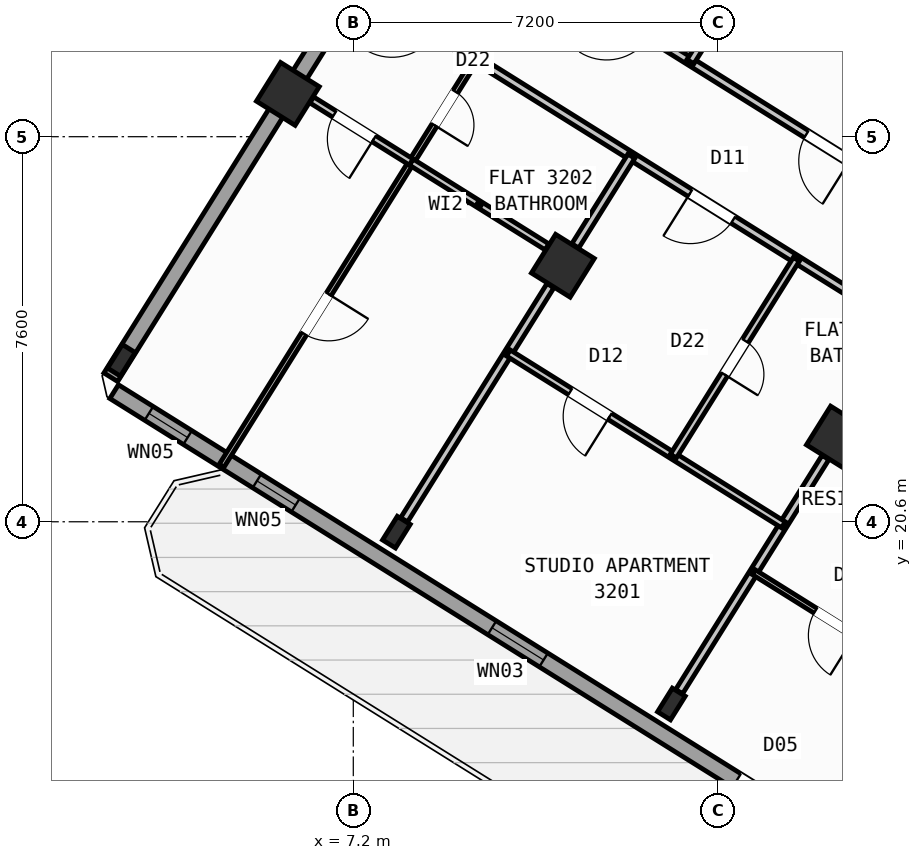
"""IFC4 building model, lengths in metres.
Left out: names, types, materials, properties, quantities, classifications, styles, units other than length and angle.
Written with IfcOpenShell. Run it as: python <this file> out.ifc"""

import sys

from ifc_helpers import new_model, si_unit, direction, frame, frame_2d, origin, origin_2d, place, context, subcontext, project, spatial, rectangle, hollow_rectangle, i_section, extrude, source, transform, mapped, element, fill, save


model = new_model("IFC4")
c1 = context("Model", 3, precision=1e-05, world=origin(), true_north=direction((0.0, 1.0)))
c2 = subcontext(c1, "Body", "Model", "MODEL_VIEW")
j1 = project(units=[si_unit("LENGTHUNIT", "METRE"), si_unit("PLANEANGLEUNIT", "RADIAN")], contexts=[c1])
p1 = place(None, origin())
s1 = spatial("IfcSite", under=j1, at=p1, CompositionType="ELEMENT")
p2 = place(p1, origin())
s2 = spatial("IfcBuilding", under=s1, at=p2, CompositionType="ELEMENT")
p3 = place(p2, frame((0.0, 0.0, 127.8)))
s3 = spatial("IfcBuildingStorey", under=s2, at=p3, CompositionType="ELEMENT", Elevation=127.8)
m1 = source(origin(), c2, "Body", "SweptSolid", [
    extrude(hollow_rectangle(XDim=0.9, YDim=0.9, WallThickness=0.036, at=origin_2d()), origin(), (0.0, 0.0, 1.0), 4.8),
])
p4 = place(p3, frame((16.764, 22.261, 0.0), z_axis=(0.0, 0.0, 1.0), x_axis=(-0.848048096156, 0.529919264233, 0.0)))
e1 = element("IfcColumn", 1, at=p4, inside=s3, PredefinedType="COLUMN", context=c2, shape_type="MappedRepresentation", body=[
    mapped(m1, transform((0.0, 0.0, 0.0), scale=1.0)),
])
m2 = source(origin(), c2, "Body", "SweptSolid", [
    extrude(i_section(OverallWidth=0.3, OverallDepth=0.55, WebThickness=0.015, FlangeThickness=0.029, at=origin_2d()), origin(), (0.0, 0.0, 1.0), 4.8),
])
p5 = place(p3, frame((13.478, 17.003, 0.0), z_axis=(0.0, 0.0, 1.0), x_axis=(-0.848048096156, 0.529919264233, 0.0)))
e2 = element("IfcColumn", 2, at=p5, inside=s3, PredefinedType="COLUMN", context=c2, shape_type="MappedRepresentation", body=[
    mapped(m2, transform((0.0, 0.0, 0.0), scale=1.0)),
])
p6 = place(p3, frame((11.336, 25.653, 0.0), z_axis=(0.0, 0.0, 1.0), x_axis=(-0.848048096156, 0.529919264233, 0.0)))
e3 = element("IfcColumn", 3, at=p6, inside=s3, PredefinedType="COLUMN", context=c2, shape_type="MappedRepresentation", body=[
    mapped(m1, transform((0.0, 0.0, 0.0), scale=1.0)),
])
p7 = place(p3, frame((8.051, 20.395, 0.0), z_axis=(0.0, 0.0, 1.0), x_axis=(-0.848048096156, 0.529919264233, 0.0)))
e4 = element("IfcColumn", 4, at=p7, inside=s3, PredefinedType="COLUMN", context=c2, shape_type="MappedRepresentation", body=[
    mapped(m2, transform((0.0, 0.0, 0.0), scale=1.0)),
])
p8 = place(p3, frame((5.909, 29.044, 0.0), z_axis=(0.0, 0.0, 1.0), x_axis=(-0.848048096156, 0.529919264233, 0.0)))
e5 = element("IfcColumn", 5, at=p8, inside=s3, PredefinedType="COLUMN", context=c2, shape_type="MappedRepresentation", body=[
    mapped(m1, transform((0.0, 0.0, 0.0), scale=1.0)),
])
p9 = place(p3, frame((2.623, 23.786, 0.0), z_axis=(0.0, 0.0, 1.0), x_axis=(-0.848048096156, 0.529919264233, 0.0)))
e6 = element("IfcColumn", 6, at=p9, inside=s3, PredefinedType="COLUMN", context=c2, shape_type="MappedRepresentation", body=[
    mapped(m2, transform((0.0, 0.0, 0.0), scale=1.0)),
])
p10 = place(p3, frame((29.268, 6.429, 0.0), z_axis=(0.0, 0.0, 1.0), x_axis=(-0.848049971435, 0.529916263149, 0.0)))
e7 = element("IfcWall", 7, at=p10, inside=s3, PredefinedType="STANDARD", context=c2, shape_type="SweptSolid", body=[
    extrude(rectangle(XDim=31.588, YDim=0.32, at=frame_2d((15.794, 0.0))), origin(), (0.0, 0.0, 1.0), 4.55),
])
p11 = place(p10, frame((15.901, 0.0, 0.0)))
e8 = element("IfcOpeningElement", 8, at=p11, cuts=e7, PredefinedType="OPENING", context=c2, shape_type="SweptSolid", body=[
    extrude(rectangle(XDim=1.2, YDim=2.15, at=frame_2d((0.6, 1.075))), frame((0.0, 0.17, 0.0), z_axis=(0.0, -1.0, 0.0), x_axis=(1.0, 0.0, 0.0)), (0.0, 0.0, 1.0), 0.34),
])
p12 = place(p10, frame((3.454, 0.0, 0.95)))
e9 = element("IfcOpeningElement", 9, at=p12, cuts=e7, PredefinedType="OPENING", context=c2, shape_type="SweptSolid", body=[
    extrude(rectangle(XDim=1.2, YDim=1.4, at=frame_2d((0.6, 0.7))), frame((0.0, 0.17, 0.0), z_axis=(0.0, -1.0, 0.0), x_axis=(1.0, 0.0, 0.0)), (0.0, 0.0, 1.0), 0.34),
])
p13 = place(p10, frame((7.561, 0.0, 0.85)))
e10 = element("IfcOpeningElement", 10, at=p13, cuts=e7, PredefinedType="OPENING", context=c2, shape_type="SweptSolid", body=[
    extrude(rectangle(XDim=1.8, YDim=1.5, at=frame_2d((0.9, 0.75))), frame((0.0, 0.17, 0.0), z_axis=(0.0, -1.0, 0.0), x_axis=(1.0, 0.0, 0.0)), (0.0, 0.0, 1.0), 0.34),
])
p14 = place(p10, frame((21.594, 0.0, 0.95)))
e11 = element("IfcOpeningElement", 11, at=p14, cuts=e7, PredefinedType="OPENING", context=c2, shape_type="SweptSolid", body=[
    extrude(rectangle(XDim=1.2, YDim=1.4, at=frame_2d((0.6, 0.7))), frame((0.0, 0.17, 0.0), z_axis=(0.0, -1.0, 0.0), x_axis=(1.0, 0.0, 0.0)), (0.0, 0.0, 1.0), 0.34),
])
p15 = place(p10, frame((29.878, 0.0, 1.0)))
e12 = element("IfcOpeningElement", 12, at=p15, cuts=e7, PredefinedType="OPENING", context=c2, shape_type="SweptSolid", body=[
    extrude(rectangle(XDim=0.9, YDim=1.25, at=frame_2d((0.45, 0.625))), frame((0.0, 0.17, 0.0), z_axis=(0.0, -1.0, 0.0), x_axis=(1.0, 0.0, 0.0)), (0.0, 0.0, 1.0), 0.34),
])
p16 = place(p10, frame((27.364, 0.0, 1.0)))
e13 = element("IfcOpeningElement", 13, at=p16, cuts=e7, PredefinedType="OPENING", context=c2, shape_type="SweptSolid", body=[
    extrude(rectangle(XDim=0.9, YDim=1.25, at=frame_2d((0.45, 0.625))), frame((0.0, 0.17, 0.0), z_axis=(0.0, -1.0, 0.0), x_axis=(1.0, 0.0, 0.0)), (0.0, 0.0, 1.0), 0.34),
])
p17 = place(p3, frame((2.415, 23.452, 0.0), z_axis=(0.0, 0.0, 1.0), x_axis=(0.52991049553, 0.848053575387, 0.0)))
e14 = element("IfcWall", 14, at=p17, inside=s3, PredefinedType="STANDARD", context=c2, shape_type="SweptSolid", body=[
    extrude(rectangle(XDim=21.587, YDim=0.32, at=frame_2d((10.794, 0.0))), origin(), (0.0, 0.0, 1.0), 3.975),
])
p18 = place(p17, frame((16.344, 0.0, 0.75)))
e15 = element("IfcOpeningElement", 15, at=p18, cuts=e14, PredefinedType="OPENING", context=c2, shape_type="SweptSolid", body=[
    extrude(rectangle(XDim=2.4, YDim=1.6, at=frame_2d((1.2, 0.8))), frame((0.0, 0.17, 0.0), z_axis=(0.0, -1.0, 0.0), x_axis=(1.0, 0.0, 0.0)), (0.0, 0.0, 1.0), 0.34),
])
p19 = place(p3, frame((14.138, 41.825, 0.0), z_axis=(0.0, 0.0, 1.0), x_axis=(0.848046498049, -0.529921821731, 0.0)))
e16 = element("IfcWall", 16, at=p19, inside=s3, PredefinedType="STANDARD", context=c2, shape_type="SweptSolid", body=[
    extrude(rectangle(XDim=31.588, YDim=0.32, at=frame_2d((15.794, 0.0))), origin(), (0.0, 0.0, 1.0), 4.55),
])
p20 = place(p19, frame((9.69, 0.0, 0.0)))
e17 = element("IfcOpeningElement", 17, at=p20, cuts=e16, PredefinedType="OPENING", context=c2, shape_type="SweptSolid", body=[
    extrude(rectangle(XDim=1.05, YDim=2.15, at=frame_2d((0.525, 1.075))), frame((0.0, 0.17, 0.0), z_axis=(0.0, -1.0, 0.0), x_axis=(1.0, 0.0, 0.0)), (0.0, 0.0, 1.0), 0.34),
])
p21 = place(p19, frame((14.666, 0.0, 0.0)))
e18 = element("IfcOpeningElement", 18, at=p21, cuts=e16, PredefinedType="OPENING", context=c2, shape_type="SweptSolid", body=[
    extrude(rectangle(XDim=1.5, YDim=2.25, at=frame_2d((0.75, 1.125))), frame((0.0, 0.17, 0.0), z_axis=(0.0, -1.0, 0.0), x_axis=(1.0, 0.0, 0.0)), (0.0, 0.0, 1.0), 0.34),
])
p22 = place(p19, frame((0.791, 0.0, 0.85)))
e19 = element("IfcOpeningElement", 19, at=p22, cuts=e16, PredefinedType="OPENING", context=c2, shape_type="SweptSolid", body=[
    extrude(rectangle(XDim=1.8, YDim=1.5, at=frame_2d((0.9, 0.75))), frame((0.0, 0.17, 0.0), z_axis=(0.0, -1.0, 0.0), x_axis=(1.0, 0.0, 0.0)), (0.0, 0.0, 1.0), 0.34),
])
p23 = place(p19, frame((3.996, 0.0, 0.95)))
e20 = element("IfcOpeningElement", 20, at=p23, cuts=e16, PredefinedType="OPENING", context=c2, shape_type="SweptSolid", body=[
    extrude(rectangle(XDim=1.2, YDim=1.4, at=frame_2d((0.6, 0.7))), frame((0.0, 0.17, 0.0), z_axis=(0.0, -1.0, 0.0), x_axis=(1.0, 0.0, 0.0)), (0.0, 0.0, 1.0), 0.34),
])
p24 = place(p19, frame((7.582, 0.0, 0.95)))
e21 = element("IfcOpeningElement", 21, at=p24, cuts=e16, PredefinedType="OPENING", context=c2, shape_type="SweptSolid", body=[
    extrude(rectangle(XDim=1.2, YDim=1.4, at=frame_2d((0.6, 0.7))), frame((0.0, 0.17, 0.0), z_axis=(0.0, -1.0, 0.0), x_axis=(1.0, 0.0, 0.0)), (0.0, 0.0, 1.0), 0.34),
])
p25 = place(p19, frame((21.381, 0.0, 0.75)))
e22 = element("IfcOpeningElement", 22, at=p25, cuts=e16, PredefinedType="OPENING", context=c2, shape_type="SweptSolid", body=[
    extrude(rectangle(XDim=2.4, YDim=1.6, at=frame_2d((1.2, 0.8))), frame((0.0, 0.17, 0.0), z_axis=(0.0, -1.0, 0.0), x_axis=(1.0, 0.0, 0.0)), (0.0, 0.0, 1.0), 0.34),
])
p26 = place(p19, frame((26.956, 0.0, 0.75)))
e23 = element("IfcOpeningElement", 23, at=p26, cuts=e16, PredefinedType="OPENING", context=c2, shape_type="SweptSolid", body=[
    extrude(rectangle(XDim=2.4, YDim=1.6, at=frame_2d((1.2, 0.8))), frame((0.0, 0.17, 0.0), z_axis=(0.0, -1.0, 0.0), x_axis=(1.0, 0.0, 0.0)), (0.0, 0.0, 1.0), 0.34),
])
p27 = place(p3, frame((21.329, 22.416, 0.0), z_axis=(0.0, 0.0, 1.0), x_axis=(-0.529920220799, -0.848047498427, 0.0)))
e24 = element("IfcWall", 24, at=p27, inside=s3, PredefinedType="PARTITIONING", context=c2, shape_type="SweptSolid", body=[
    extrude(rectangle(XDim=9.2, YDim=0.16, at=frame_2d((4.6, 0.0))), origin(), (0.0, 0.0, 1.0), 4.54),
])
p28 = place(p3, frame((22.495, 24.281, 0.0), z_axis=(0.0, 0.0, 1.0), x_axis=(-0.848052408131, 0.529912363569, 0.0)))
e25 = element("IfcWall", 25, at=p28, inside=s3, PredefinedType="PARTITIONING", context=c2, shape_type="SweptSolid", body=[
    extrude(rectangle(XDim=16.73, YDim=0.16, at=frame_2d((8.365, 0.0))), origin(), (0.0, 0.0, 1.0), 4.54),
])
p29 = place(p28, frame((2.22, 0.0, 0.0)))
e26 = element("IfcOpeningElement", 26, at=p29, cuts=e25, PredefinedType="OPENING", context=c2, shape_type="SweptSolid", body=[
    extrude(rectangle(XDim=0.86, YDim=2.05, at=frame_2d((0.43, 1.025))), frame((0.0, 0.09, 0.0), z_axis=(0.0, -1.0, 0.0), x_axis=(1.0, 0.0, 0.0)), (0.0, 0.0, 1.0), 0.18),
])
p30 = place(p28, frame((6.49, 0.0, 0.0)))
e27 = element("IfcOpeningElement", 27, at=p30, cuts=e25, PredefinedType="OPENING", context=c2, shape_type="SweptSolid", body=[
    extrude(rectangle(XDim=1.0, YDim=2.1, at=frame_2d((0.5, 1.05))), frame((0.0, 0.09, 0.0), z_axis=(0.0, -1.0, 0.0), x_axis=(1.0, 0.0, 0.0)), (0.0, 0.0, 1.0), 0.18),
])
p31 = place(p28, frame((11.14, 0.0, 0.0)))
e28 = element("IfcOpeningElement", 28, at=p31, cuts=e25, PredefinedType="OPENING", context=c2, shape_type="SweptSolid", body=[
    extrude(rectangle(XDim=1.0, YDim=2.1, at=frame_2d((0.5, 1.05))), frame((0.0, 0.09, 0.0), z_axis=(0.0, -1.0, 0.0), x_axis=(1.0, 0.0, 0.0)), (0.0, 0.0, 1.0), 0.18),
])
p32 = place(p3, frame((21.329, 22.416, 0.0), z_axis=(0.0, 0.0, 1.0), x_axis=(-0.848052408131, 0.529912363569, 0.0)))
e29 = element("IfcWall", 29, at=p32, inside=s3, PredefinedType="PARTITIONING", context=c2, shape_type="SweptSolid", body=[
    extrude(rectangle(XDim=16.73, YDim=0.16, at=frame_2d((8.365, 0.0))), origin(), (0.0, 0.0, 1.0), 4.54),
])
p33 = place(p32, frame((1.395, 0.0, 0.0)))
e30 = element("IfcOpeningElement", 30, at=p33, cuts=e29, PredefinedType="OPENING", context=c2, shape_type="SweptSolid", body=[
    extrude(rectangle(XDim=1.0, YDim=2.1, at=frame_2d((0.5, 1.05))), frame((0.0, 0.09, 0.0), z_axis=(0.0, -1.0, 0.0), x_axis=(1.0, 0.0, 0.0)), (0.0, 0.0, 1.0), 0.18),
])
p34 = place(p32, frame((7.82, 0.0, 0.0)))
e31 = element("IfcOpeningElement", 31, at=p34, cuts=e29, PredefinedType="OPENING", context=c2, shape_type="SweptSolid", body=[
    extrude(rectangle(XDim=1.0, YDim=2.1, at=frame_2d((0.5, 1.05))), frame((0.0, 0.09, 0.0), z_axis=(0.0, -1.0, 0.0), x_axis=(1.0, 0.0, 0.0)), (0.0, 0.0, 1.0), 0.18),
])
p35 = place(p32, frame((14.76, 0.0, 0.0)))
e32 = element("IfcOpeningElement", 32, at=p35, cuts=e29, PredefinedType="OPENING", context=c2, shape_type="SweptSolid", body=[
    extrude(rectangle(XDim=1.0, YDim=2.1, at=frame_2d((0.5, 1.05))), frame((0.0, 0.09, 0.0), z_axis=(0.0, -1.0, 0.0), x_axis=(1.0, 0.0, 0.0)), (0.0, 0.0, 1.0), 0.18),
])
p36 = place(p3, frame((16.519, 21.87, 0.0), z_axis=(0.0, 0.0, 1.0), x_axis=(-0.529922447305, -0.848046107144, 0.0)))
e33 = element("IfcWall", 33, at=p36, inside=s3, PredefinedType="PARTITIONING", context=c2, shape_type="SweptSolid", body=[
    extrude(rectangle(XDim=5.451, YDim=0.16, at=frame_2d((2.726, 0.0))), origin(), (0.0, 0.0, 1.0), 3.975),
])
p37 = place(p3, frame((18.318, 17.597, 0.0), z_axis=(0.0, 0.0, 1.0), x_axis=(-0.848059820872, 0.529900500304, 0.0)))
e34 = element("IfcWall", 34, at=p37, inside=s3, PredefinedType="PARTITIONING", context=c2, shape_type="SweptSolid", body=[
    extrude(rectangle(XDim=3.79, YDim=0.11, at=frame_2d((1.895, 0.0))), origin(), (0.0, 0.0, 1.0), 4.54),
])
p38 = place(p37, frame((1.435, 0.0, 0.0)))
e35 = element("IfcOpeningElement", 35, at=p38, cuts=e34, PredefinedType="OPENING", context=c2, shape_type="SweptSolid", body=[
    extrude(rectangle(XDim=0.92, YDim=2.08, at=frame_2d((0.46, 1.04))), frame((0.0, 0.065, 0.0), z_axis=(0.0, -1.0, 0.0), x_axis=(1.0, 0.0, 0.0)), (0.0, 0.0, 1.0), 0.13),
])
p39 = place(p3, frame((12.688, 27.815, 0.0), z_axis=(0.0, 0.0, 1.0), x_axis=(-0.529988430496, -0.848004872356, 0.0)))
e36 = element("IfcWall", 36, at=p39, inside=s3, PredefinedType="PARTITIONING", context=c2, shape_type="SweptSolid", body=[
    extrude(rectangle(XDim=2.088, YDim=0.16, at=frame_2d((1.044, 0.0))), origin(), (0.0, 0.0, 1.0), 3.975),
])
p40 = place(p3, frame((11.091, 25.261, 0.0), z_axis=(0.0, 0.0, 1.0), x_axis=(-0.52994257524, -0.848033529377, 0.0)))
e37 = element("IfcWall", 37, at=p40, inside=s3, PredefinedType="PARTITIONING", context=c2, shape_type="SweptSolid", body=[
    extrude(rectangle(XDim=5.451, YDim=0.16, at=frame_2d((2.726, 0.0))), origin(), (0.0, 0.0, 1.0), 3.975),
])
p41 = place(p3, frame((15.688, 20.54, 0.0), z_axis=(0.0, 0.0, 1.0), x_axis=(-0.848049732085, 0.529916646191, 0.0)))
e38 = element("IfcWall", 38, at=p41, inside=s3, PredefinedType="PLUMBINGWALL", context=c2, shape_type="SweptSolid", body=[
    extrude(rectangle(XDim=6.4, YDim=0.14, at=frame_2d((3.2, 0.0))), origin(), (0.0, 0.0, 1.0), 4.54),
])
p42 = place(p41, frame((4.04, 0.0, 0.0)))
e39 = element("IfcOpeningElement", 39, at=p42, cuts=e38, PredefinedType="OPENING", context=c2, shape_type="SweptSolid", body=[
    extrude(rectangle(XDim=0.92, YDim=2.08, at=frame_2d((0.46, 1.04))), frame((0.0, 0.08, 0.0), z_axis=(0.0, -1.0, 0.0), x_axis=(1.0, 0.0, 0.0)), (0.0, 0.0, 1.0), 0.16),
])
p43 = place(p3, frame((15.944, 25.781, 0.0), z_axis=(0.0, 0.0, 1.0), x_axis=(-0.529917480809, -0.848049210561, 0.0)))
e40 = element("IfcWall", 40, at=p43, inside=s3, PredefinedType="PLUMBINGWALL", context=c2, shape_type="SweptSolid", body=[
    extrude(rectangle(XDim=4.58, YDim=0.14, at=frame_2d((2.29, 0.0))), origin(), (0.0, 0.0, 1.0), 4.54),
])
p44 = place(p43, frame((1.9, 0.0, 0.0)))
e41 = element("IfcOpeningElement", 41, at=p44, cuts=e40, PredefinedType="OPENING", context=c2, shape_type="SweptSolid", body=[
    extrude(rectangle(XDim=0.78, YDim=2.05, at=frame_2d((0.39, 1.025))), frame((0.0, 0.08, 0.0), z_axis=(0.0, -1.0, 0.0), x_axis=(1.0, 0.0, 0.0)), (0.0, 0.0, 1.0), 0.16),
])
p45 = place(p3, frame((9.617, 29.734, 0.0), z_axis=(0.0, 0.0, 1.0), x_axis=(-0.529917830441, -0.848048992088, 0.0)))
e42 = element("IfcWall", 42, at=p45, inside=s3, PredefinedType="PARTITIONING", context=c2, shape_type="SweptSolid", body=[
    extrude(rectangle(XDim=9.47, YDim=0.11, at=frame_2d((4.735, 0.0))), origin(), (0.0, 0.0, 1.0), 4.54),
])
p46 = place(p45, frame((0.76, 0.0, 0.0)))
e43 = element("IfcOpeningElement", 43, at=p46, cuts=e42, PredefinedType="OPENING", context=c2, shape_type="SweptSolid", body=[
    extrude(rectangle(XDim=0.78, YDim=2.05, at=frame_2d((0.39, 1.025))), frame((0.0, 0.065, 0.0), z_axis=(0.0, -1.0, 0.0), x_axis=(1.0, 0.0, 0.0)), (0.0, 0.0, 1.0), 0.13),
])
p47 = place(p45, frame((5.475, 0.0, 0.0)))
e44 = element("IfcOpeningElement", 44, at=p47, cuts=e42, PredefinedType="OPENING", context=c2, shape_type="SweptSolid", body=[
    extrude(rectangle(XDim=0.92, YDim=2.08, at=frame_2d((0.46, 1.04))), frame((0.0, 0.065, 0.0), z_axis=(0.0, -1.0, 0.0), x_axis=(1.0, 0.0, 0.0)), (0.0, 0.0, 1.0), 0.13),
])
p48 = place(p3, frame((8.346, 27.698, 0.0), z_axis=(0.0, 0.0, 1.0), x_axis=(-0.848021970166, 0.529961072265, 0.0)))
e45 = element("IfcWall", 45, at=p48, inside=s3, PredefinedType="PLUMBINGWALL", context=c2, shape_type="SweptSolid", body=[
    extrude(rectangle(XDim=2.318, YDim=0.14, at=frame_2d((1.159, 0.0))), origin(), (0.0, 0.0, 1.0), 3.975),
])
p49 = place(p48, frame((0.87, 0.0, 0.0)))
e46 = element("IfcOpeningElement", 46, at=p49, cuts=e45, PredefinedType="OPENING", context=c2, shape_type="SweptSolid", body=[
    extrude(rectangle(XDim=0.92, YDim=2.08, at=frame_2d((0.46, 1.04))), frame((0.0, 0.08, 0.0), z_axis=(0.0, -1.0, 0.0), x_axis=(1.0, 0.0, 0.0)), (0.0, 0.0, 1.0), 0.16),
])
p50 = place(p3, frame((11.024, 26.025, 0.0), z_axis=(0.0, 0.0, 1.0), x_axis=(-0.848054764307, 0.529908592812, 0.0)))
e47 = element("IfcWall", 47, at=p50, inside=s3, PredefinedType="PLUMBINGWALL", context=c2, shape_type="SweptSolid", body=[
    extrude(rectangle(XDim=3.158, YDim=0.14, at=frame_2d((1.579, 0.0))), origin(), (0.0, 0.0, 1.0), 3.975),
])
p51 = place(p3, frame((14.96, 31.452, 0.0), z_axis=(0.0, 0.0, 1.0), x_axis=(-0.529956894714, -0.848024580862, 0.0)))
e48 = element("IfcWall", 48, at=p51, inside=s3, PredefinedType="PARTITIONING", context=c2, shape_type="SweptSolid", body=[
    extrude(rectangle(XDim=2.088, YDim=0.16, at=frame_2d((1.044, 0.0))), origin(), (0.0, 0.0, 1.0), 3.975),
])
m3 = source(origin(), c2, "Body", "SweptSolid", [
    extrude(rectangle(XDim=1.2, YDim=2.15, at=frame_2d((0.6, 1.075))), frame((0.0, 0.025, 0.0), z_axis=(0.0, -1.0, 0.0), x_axis=(1.0, 0.0, 0.0)), (0.0, 0.0, 1.0), 0.05),
])
p52 = place(p11, origin())
e49 = element("IfcDoor", 49, at=p52, inside=s3, OperationType="SINGLE_SWING_LEFT", PredefinedType="DOOR", context=c2, shape_type="MappedRepresentation", body=[
    mapped(m3, transform((0.0, 0.0, 0.0), scale=1.0)),
])
fill(e8, e49)
m4 = source(origin(), c2, "Body", "SweptSolid", [
    extrude(rectangle(XDim=1.2, YDim=1.4, at=frame_2d((0.6, 0.7))), frame((0.0, 0.03, 0.0), z_axis=(0.0, -1.0, 0.0), x_axis=(1.0, 0.0, 0.0)), (0.0, 0.0, 1.0), 0.06),
])
p53 = place(p14, origin())
e50 = element("IfcWindow", 50, at=p53, inside=s3, PartitioningType="SINGLE_PANEL", PredefinedType="WINDOW", context=c2, shape_type="MappedRepresentation", body=[
    mapped(m4, transform((0.0, 0.0, 0.0), scale=1.0)),
])
fill(e11, e50)
m5 = source(origin(), c2, "Body", "SweptSolid", [
    extrude(rectangle(XDim=0.9, YDim=1.25, at=frame_2d((0.45, 0.625))), frame((0.0, 0.03, 0.0), z_axis=(0.0, -1.0, 0.0), x_axis=(1.0, 0.0, 0.0)), (0.0, 0.0, 1.0), 0.06),
])
p54 = place(p15, origin())
e51 = element("IfcWindow", 51, at=p54, inside=s3, PartitioningType="SINGLE_PANEL", PredefinedType="WINDOW", context=c2, shape_type="MappedRepresentation", body=[
    mapped(m5, transform((0.0, 0.0, 0.0), scale=1.0)),
])
fill(e12, e51)
p55 = place(p16, origin())
e52 = element("IfcWindow", 52, at=p55, inside=s3, PartitioningType="SINGLE_PANEL", PredefinedType="WINDOW", context=c2, shape_type="MappedRepresentation", body=[
    mapped(m5, transform((0.0, 0.0, 0.0), scale=1.0)),
])
fill(e13, e52)
m6 = source(origin(), c2, "Body", "SweptSolid", [
    extrude(rectangle(XDim=0.92, YDim=2.08, at=frame_2d((0.46, 1.04))), frame((0.0, 0.025, 0.0), z_axis=(0.0, -1.0, 0.0), x_axis=(1.0, 0.0, 0.0)), (0.0, 0.0, 1.0), 0.05),
])
p56 = place(p38, origin())
e53 = element("IfcDoor", 53, at=p56, inside=s3, OperationType="SINGLE_SWING_LEFT", PredefinedType="DOOR", context=c2, shape_type="MappedRepresentation", body=[
    mapped(m6, transform((0.0, 0.0, 0.0), scale=1.0)),
])
fill(e35, e53)
m7 = source(origin(), c2, "Body", "SweptSolid", [
    extrude(rectangle(XDim=1.0, YDim=2.1, at=frame_2d((0.5, 1.05))), frame((0.0, 0.025, 0.0), z_axis=(0.0, -1.0, 0.0), x_axis=(1.0, 0.0, 0.0)), (0.0, 0.0, 1.0), 0.05),
])
p57 = place(p34, origin())
e54 = element("IfcDoor", 54, at=p57, inside=s3, OperationType="SINGLE_SWING_RIGHT", PredefinedType="DOOR", context=c2, shape_type="MappedRepresentation", body=[
    mapped(m7, transform((0.0, 0.0, 0.0), scale=1.0)),
])
fill(e31, e54)
p58 = place(p42, origin())
e55 = element("IfcDoor", 55, at=p58, inside=s3, OperationType="SINGLE_SWING_LEFT", PredefinedType="DOOR", context=c2, shape_type="MappedRepresentation", body=[
    mapped(m6, transform((0.0, 0.0, 0.0), scale=1.0)),
])
fill(e39, e55)
m8 = source(origin(), c2, "Body", "SweptSolid", [
    extrude(rectangle(XDim=0.78, YDim=2.05, at=frame_2d((0.39, 1.025))), frame((0.0, 0.025, 0.0), z_axis=(0.0, -1.0, 0.0), x_axis=(1.0, 0.0, 0.0)), (0.0, 0.0, 1.0), 0.05),
])
p59 = place(p44, origin())
e56 = element("IfcDoor", 56, at=p59, inside=s3, OperationType="SINGLE_SWING_RIGHT", PredefinedType="DOOR", context=c2, shape_type="MappedRepresentation", body=[
    mapped(m8, transform((0.0, 0.0, 0.0), scale=1.0)),
])
fill(e41, e56)
p60 = place(p49, origin())
e57 = element("IfcDoor", 57, at=p60, inside=s3, OperationType="SINGLE_SWING_LEFT", PredefinedType="DOOR", context=c2, shape_type="MappedRepresentation", body=[
    mapped(m6, transform((0.0, 0.0, 0.0), scale=1.0)),
])
fill(e46, e57)
p61 = place(p46, origin())
e58 = element("IfcDoor", 58, at=p61, inside=s3, OperationType="SINGLE_SWING_RIGHT", PredefinedType="DOOR", context=c2, shape_type="MappedRepresentation", body=[
    mapped(m8, transform((0.0, 0.0, 0.0), scale=1.0)),
])
fill(e43, e58)
p62 = place(p47, origin())
e59 = element("IfcDoor", 59, at=p62, inside=s3, OperationType="SINGLE_SWING_LEFT", PredefinedType="DOOR", context=c2, shape_type="MappedRepresentation", body=[
    mapped(m6, transform((0.0, 0.0, 0.0), scale=1.0)),
])
fill(e44, e59)
p63 = place(p30, origin())
e60 = element("IfcDoor", 60, at=p63, inside=s3, OperationType="SINGLE_SWING_LEFT", PredefinedType="DOOR", context=c2, shape_type="MappedRepresentation", body=[
    mapped(m7, transform((0.0, 0.0, 0.0), scale=1.0)),
])
fill(e27, e60)
save(model, sys.argv[1])
